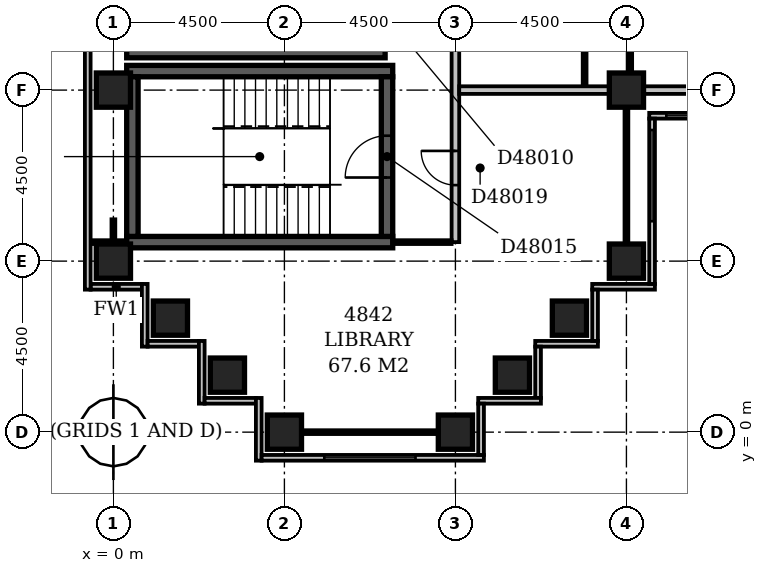
"""IFC4 building model, lengths in metres.
Left out: names, types, materials, properties, quantities, classifications, styles, units other than length and angle.
Written with IfcOpenShell. Run it as: python <this file> out.ifc"""

import sys

from ifc_helpers import new_model, si_unit, direction, frame, frame_2d, origin, origin_2d, place, context, subcontext, project, spatial, rectangle, extrude, element, fill, save


model = new_model("IFC4")
c1 = context("Model", 3, precision=1e-05, world=origin(), true_north=direction((0.0, 1.0)))
c2 = subcontext(c1, "Body", "Model", "MODEL_VIEW")
j1 = project(units=[si_unit("LENGTHUNIT", "METRE"), si_unit("PLANEANGLEUNIT", "RADIAN")], contexts=[c1])
p1 = place(None, origin())
s1 = spatial("IfcSite", under=j1, at=p1, CompositionType="ELEMENT")
p2 = place(p1, origin())
s2 = spatial("IfcBuilding", under=s1, at=p2, CompositionType="ELEMENT")
p3 = place(p2, frame((0.0, 0.0, 189.8)))
s3 = spatial("IfcBuildingStorey", under=s2, at=p3, CompositionType="ELEMENT", Elevation=189.8)
for number, where, z_axis, x_axis in (
    (1, (0.35, 5.0, -0.3), (0.0, 0.0, 1.0), (1.0, 0.0, 0.0)),
    (2, (0.35, 9.5, -0.3), (0.0, 0.0, 1.0), (1.0, 0.0, 0.0)),
):
    element("IfcWall", number, at=place(p3, frame(where, z_axis=z_axis, x_axis=x_axis)), inside=s3, PredefinedType="SHEAR", context=c2, shape_type="SweptSolid", body=[
        extrude(rectangle(XDim=7.0, YDim=0.3, at=frame_2d((3.5, 0.0))), origin(), (0.0, 0.0, 1.0), 3.6),
    ])
p4 = place(p3, frame((0.35, 10.0, -0.3), z_axis=(0.0, 0.0, 1.0), x_axis=(1.0, 0.0, 0.0)))
e3 = element("IfcWall", 3, at=p4, inside=s3, PredefinedType="SHEAR", context=c2, shape_type="SweptSolid", body=[
    extrude(rectangle(XDim=6.8, YDim=0.3, at=frame_2d((3.4, 0.0))), origin(), (0.0, 0.0, 1.0), 3.6),
])
p5 = place(p3, frame((0.5, 5.15, -0.3), z_axis=(0.0, 0.0, 1.0), x_axis=(0.0, 1.0, 0.0)))
e4 = element("IfcWall", 4, at=p5, inside=s3, PredefinedType="SHEAR", context=c2, shape_type="SweptSolid", body=[
    extrude(rectangle(XDim=4.2, YDim=0.3, at=frame_2d((2.1, 0.0))), origin(), (0.0, 0.0, 1.0), 3.6),
])
p6 = place(p3, frame((7.2, 5.15, -0.3), z_axis=(0.0, 0.0, 1.0), x_axis=(0.0, 1.0, 0.0)))
e5 = element("IfcWall", 5, at=p6, inside=s3, PredefinedType="SHEAR", context=c2, shape_type="SweptSolid", body=[
    extrude(rectangle(XDim=4.2, YDim=0.3, at=frame_2d((2.1, 0.0))), origin(), (0.0, 0.0, 1.0), 3.6),
])
p7 = place(p6, frame((1.55, 0.0, 0.3)))
e6 = element("IfcOpeningElement", 6, at=p7, cuts=e5, PredefinedType="OPENING", context=c2, shape_type="SweptSolid", body=[
    extrude(rectangle(XDim=1.1, YDim=2.1, at=frame_2d((0.55, 1.05))), frame((0.0, 0.162, 0.0), z_axis=(0.0, -1.0, 0.0), x_axis=(1.0, 0.0, 0.0)), (0.0, 0.0, 1.0), 0.324),
])
for number, where, z_axis, x_axis in (
    (7, (4.5, 0.0, -0.3), (0.0, 0.0, 1.0), (1.0, 0.0, 0.0)),
    (8, (9.0, 0.0, -0.3), (0.0, 0.0, 1.0), (1.0, 0.0, 0.0)),
    (9, (3.0, 1.5, -0.3), (0.0, 0.0, 1.0), (1.0, 0.0, 0.0)),
    (10, (10.5, 1.5, -0.3), (0.0, 0.0, 1.0), (1.0, 0.0, 0.0)),
    (11, (1.5, 3.0, -0.3), (0.0, 0.0, 1.0), (1.0, 0.0, 0.0)),
    (12, (12.0, 3.0, -0.3), (0.0, 0.0, 1.0), (1.0, 0.0, 0.0)),
    (13, (0.0, 4.5, -0.3), (0.0, 0.0, 1.0), (1.0, 0.0, 0.0)),
    (14, (13.5, 4.5, -0.3), (0.0, 0.0, 1.0), (1.0, 0.0, 0.0)),
    (15, (0.0, 9.0, -0.3), (0.0, 0.0, 1.0), (1.0, 0.0, 0.0)),
    (16, (13.5, 9.0, -0.3), (0.0, 0.0, 1.0), (1.0, 0.0, 0.0)),
):
    element("IfcColumn", number, at=place(p3, frame(where, z_axis=z_axis, x_axis=x_axis)), inside=s3, PredefinedType="COLUMN", context=c2, shape_type="SweptSolid", body=[
        extrude(rectangle(XDim=0.9, YDim=0.9, at=origin_2d()), origin(), (0.0, 0.0, 1.0), 3.6),
    ])
p8 = place(p3, frame((-0.6, 3.825, 0.0), z_axis=(0.0, 0.0, 1.0), x_axis=(1.0, 0.0, 0.0)))
e17 = element("IfcWall", 17, at=p8, inside=s3, PredefinedType="STANDARD", context=c2, shape_type="SweptSolid", body=[
    extrude(rectangle(XDim=1.35, YDim=0.15, at=frame_2d((0.675, 0.0))), origin(), (0.0, 0.0, 1.0), 2.7),
])
p9 = place(p3, frame((0.825, 3.9, 0.0), z_axis=(0.0, 0.0, 1.0), x_axis=(0.0, -1.0, 0.0)))
e18 = element("IfcWall", 18, at=p9, inside=s3, PredefinedType="STANDARD", context=c2, shape_type="SweptSolid", body=[
    extrude(rectangle(XDim=1.65, YDim=0.15, at=frame_2d((0.825, 0.0))), origin(), (0.0, 0.0, 1.0), 2.7),
])
p10 = place(p3, frame((0.9, 2.325, 0.0), z_axis=(0.0, 0.0, 1.0), x_axis=(1.0, 0.0, 0.0)))
e19 = element("IfcWall", 19, at=p10, inside=s3, PredefinedType="STANDARD", context=c2, shape_type="SweptSolid", body=[
    extrude(rectangle(XDim=1.35, YDim=0.15, at=frame_2d((0.675, 0.0))), origin(), (0.0, 0.0, 1.0), 2.7),
])
p11 = place(p3, frame((2.325, 2.4, 0.0), z_axis=(0.0, 0.0, 1.0), x_axis=(0.0, -1.0, 0.0)))
e20 = element("IfcWall", 20, at=p11, inside=s3, PredefinedType="STANDARD", context=c2, shape_type="SweptSolid", body=[
    extrude(rectangle(XDim=1.65, YDim=0.15, at=frame_2d((0.825, 0.0))), origin(), (0.0, 0.0, 1.0), 2.7),
])
p12 = place(p3, frame((2.4, 0.825, 0.0), z_axis=(0.0, 0.0, 1.0), x_axis=(1.0, 0.0, 0.0)))
e21 = element("IfcWall", 21, at=p12, inside=s3, PredefinedType="STANDARD", context=c2, shape_type="SweptSolid", body=[
    extrude(rectangle(XDim=1.35, YDim=0.15, at=frame_2d((0.675, 0.0))), origin(), (0.0, 0.0, 1.0), 2.7),
])
p13 = place(p3, frame((3.825, 0.9, 0.0), z_axis=(0.0, 0.0, 1.0), x_axis=(0.0, -1.0, 0.0)))
e22 = element("IfcWall", 22, at=p13, inside=s3, PredefinedType="STANDARD", context=c2, shape_type="SweptSolid", body=[
    extrude(rectangle(XDim=1.65, YDim=0.15, at=frame_2d((0.825, 0.0))), origin(), (0.0, 0.0, 1.0), 2.7),
])
p14 = place(p3, frame((3.9, -0.675, 0.0), z_axis=(0.0, 0.0, 1.0), x_axis=(1.0, 0.0, 0.0)))
e23 = element("IfcWall", 23, at=p14, inside=s3, PredefinedType="STANDARD", context=c2, shape_type="SweptSolid", body=[
    extrude(rectangle(XDim=5.85, YDim=0.15, at=frame_2d((2.925, 0.0))), origin(), (0.0, 0.0, 1.0), 2.7),
])
p15 = place(p14, frame((1.65, 0.0, 0.6)))
e24 = element("IfcOpeningElement", 24, at=p15, cuts=e23, PredefinedType="OPENING", context=c2, shape_type="SweptSolid", body=[
    extrude(rectangle(XDim=2.4, YDim=1.8, at=frame_2d((1.2, 0.9))), frame((0.0, 0.087, 0.0), z_axis=(0.0, -1.0, 0.0), x_axis=(1.0, 0.0, 0.0)), (0.0, 0.0, 1.0), 0.174),
])
p16 = place(p3, frame((9.675, -0.6, 0.0), z_axis=(0.0, 0.0, 1.0), x_axis=(0.0, 1.0, 0.0)))
e25 = element("IfcWall", 25, at=p16, inside=s3, PredefinedType="STANDARD", context=c2, shape_type="SweptSolid", body=[
    extrude(rectangle(XDim=1.35, YDim=0.15, at=frame_2d((0.675, 0.0))), origin(), (0.0, 0.0, 1.0), 2.7),
])
p17 = place(p3, frame((9.6, 0.825, 0.0), z_axis=(0.0, 0.0, 1.0), x_axis=(1.0, 0.0, 0.0)))
e26 = element("IfcWall", 26, at=p17, inside=s3, PredefinedType="STANDARD", context=c2, shape_type="SweptSolid", body=[
    extrude(rectangle(XDim=1.65, YDim=0.15, at=frame_2d((0.825, 0.0))), origin(), (0.0, 0.0, 1.0), 2.7),
])
p18 = place(p3, frame((11.175, 0.9, 0.0), z_axis=(0.0, 0.0, 1.0), x_axis=(0.0, 1.0, 0.0)))
e27 = element("IfcWall", 27, at=p18, inside=s3, PredefinedType="STANDARD", context=c2, shape_type="SweptSolid", body=[
    extrude(rectangle(XDim=1.35, YDim=0.15, at=frame_2d((0.675, 0.0))), origin(), (0.0, 0.0, 1.0), 2.7),
])
p19 = place(p3, frame((11.1, 2.325, 0.0), z_axis=(0.0, 0.0, 1.0), x_axis=(1.0, 0.0, 0.0)))
e28 = element("IfcWall", 28, at=p19, inside=s3, PredefinedType="STANDARD", context=c2, shape_type="SweptSolid", body=[
    extrude(rectangle(XDim=1.65, YDim=0.15, at=frame_2d((0.825, 0.0))), origin(), (0.0, 0.0, 1.0), 2.7),
])
p20 = place(p3, frame((12.675, 2.4, 0.0), z_axis=(0.0, 0.0, 1.0), x_axis=(0.0, 1.0, 0.0)))
e29 = element("IfcWall", 29, at=p20, inside=s3, PredefinedType="STANDARD", context=c2, shape_type="SweptSolid", body=[
    extrude(rectangle(XDim=1.35, YDim=0.15, at=frame_2d((0.675, 0.0))), origin(), (0.0, 0.0, 1.0), 2.7),
])
p21 = place(p3, frame((12.6, 3.825, 0.0), z_axis=(0.0, 0.0, 1.0), x_axis=(1.0, 0.0, 0.0)))
e30 = element("IfcWall", 30, at=p21, inside=s3, PredefinedType="STANDARD", context=c2, shape_type="SweptSolid", body=[
    extrude(rectangle(XDim=1.65, YDim=0.15, at=frame_2d((0.825, 0.0))), origin(), (0.0, 0.0, 1.0), 2.7),
])
p22 = place(p3, frame((14.175, 3.9, 0.0), z_axis=(0.0, 0.0, 1.0), x_axis=(0.0, 1.0, 0.0)))
e31 = element("IfcWall", 31, at=p22, inside=s3, PredefinedType="STANDARD", context=c2, shape_type="SweptSolid", body=[
    extrude(rectangle(XDim=4.35, YDim=0.15, at=frame_2d((2.175, 0.0))), origin(), (0.0, 0.0, 1.0), 2.7),
])
p23 = place(p22, frame((1.65, 0.0, 0.6)))
e32 = element("IfcOpeningElement", 32, at=p23, cuts=e31, PredefinedType="OPENING", context=c2, shape_type="SweptSolid", body=[
    extrude(rectangle(XDim=2.4, YDim=1.8, at=frame_2d((1.2, 0.9))), frame((0.0, 0.087, 0.0), z_axis=(0.0, -1.0, 0.0), x_axis=(1.0, 0.0, 0.0)), (0.0, 0.0, 1.0), 0.174),
])
p24 = place(p3, frame((14.1, 8.325, 0.0), z_axis=(0.0, 0.0, 1.0), x_axis=(1.0, 0.0, 0.0)))
e33 = element("IfcWall", 33, at=p24, inside=s3, PredefinedType="STANDARD", context=c2, shape_type="SweptSolid", body=[
    extrude(rectangle(XDim=4.65, YDim=0.15, at=frame_2d((2.325, 0.0))), origin(), (0.0, 0.0, 1.0), 2.7),
])
p25 = place(p24, frame((0.45, 0.0, 0.6)))
e34 = element("IfcOpeningElement", 34, at=p25, cuts=e33, PredefinedType="OPENING", context=c2, shape_type="SweptSolid", body=[
    extrude(rectangle(XDim=2.4, YDim=1.8, at=frame_2d((1.2, 0.9))), frame((0.0, 0.087, 0.0), z_axis=(0.0, -1.0, 0.0), x_axis=(1.0, 0.0, 0.0)), (0.0, 0.0, 1.0), 0.174),
])
p26 = place(p3, frame((-0.675, 59.1, 0.0), z_axis=(0.0, 0.0, 1.0), x_axis=(0.0, -1.0, 0.0)))
e35 = element("IfcWall", 35, at=p26, inside=s3, PredefinedType="STANDARD", context=c2, shape_type="SweptSolid", body=[
    extrude(rectangle(XDim=55.35, YDim=0.15, at=frame_2d((27.675, 0.0))), origin(), (0.0, 0.0, 1.0), 2.7),
])
p27 = place(p3, frame((4.95, 0.0, 0.0), z_axis=(0.0, 0.0, 1.0), x_axis=(1.0, 0.0, 0.0)))
e36 = element("IfcWall", 36, at=p27, inside=s3, PredefinedType="PARTITIONING", context=c2, shape_type="SweptSolid", body=[
    extrude(rectangle(XDim=3.6, YDim=0.1, at=frame_2d((1.8, 0.0))), origin(), (0.0, 0.0, 1.0), 2.7),
])
p28 = place(p3, frame((0.0, 4.95, 0.0), z_axis=(0.0, 0.0, 1.0), x_axis=(0.0, 1.0, 0.0)))
e37 = element("IfcWall", 37, at=p28, inside=s3, PredefinedType="PARTITIONING", context=c2, shape_type="SweptSolid", body=[
    extrude(rectangle(XDim=0.65, YDim=0.1, at=frame_2d((0.325, 0.0))), origin(), (0.0, 0.0, 1.0), 2.7),
])
p29 = place(p3, frame((13.5, 4.95, 0.0), z_axis=(0.0, 0.0, 1.0), x_axis=(0.0, 1.0, 0.0)))
e38 = element("IfcWall", 38, at=p29, inside=s3, PredefinedType="PARTITIONING", context=c2, shape_type="SweptSolid", body=[
    extrude(rectangle(XDim=3.6, YDim=0.1, at=frame_2d((1.8, 0.0))), origin(), (0.0, 0.0, 1.0), 2.7),
])
p30 = place(p3, frame((-0.6, 5.0, 0.0), z_axis=(0.0, 0.0, 1.0), x_axis=(1.0, 0.0, 0.0)))
e39 = element("IfcWall", 39, at=p30, inside=s3, PredefinedType="PARTITIONING", context=c2, shape_type="SweptSolid", body=[
    extrude(rectangle(XDim=0.951, YDim=0.1, at=frame_2d((0.476, 0.0))), origin(), (0.0, 0.0, 1.0), 3.3),
])
p31 = place(p3, frame((7.349, 5.0, 0.0), z_axis=(0.0, 0.0, 1.0), x_axis=(1.0, 0.0, 0.0)))
e40 = element("IfcWall", 40, at=p31, inside=s3, PredefinedType="PARTITIONING", context=c2, shape_type="SweptSolid", body=[
    extrude(rectangle(XDim=1.551, YDim=0.1, at=frame_2d((0.775, 0.0))), origin(), (0.0, 0.0, 1.0), 3.3),
])
p32 = place(p3, frame((9.0, 5.0, 0.0), z_axis=(0.0, 0.0, 1.0), x_axis=(0.0, 1.0, 0.0)))
e41 = element("IfcWall", 41, at=p32, inside=s3, PredefinedType="PARTITIONING", context=c2, shape_type="SweptSolid", body=[
    extrude(rectangle(XDim=31.0, YDim=0.2, at=frame_2d((15.5, 0.0))), origin(), (0.0, 0.0, 1.0), 3.3),
])
p33 = place(p32, frame((17.8, 0.0, 0.0)))
e42 = element("IfcOpeningElement", 42, at=p33, cuts=e41, PredefinedType="OPENING", context=c2, shape_type="SweptSolid", body=[
    extrude(rectangle(XDim=1.0, YDim=2.1, at=frame_2d((0.5, 1.05))), frame((0.0, 0.112, 0.0), z_axis=(0.0, -1.0, 0.0), x_axis=(1.0, 0.0, 0.0)), (0.0, 0.0, 1.0), 0.224),
])
p34 = place(p32, frame((14.95, 0.0, 0.0)))
e43 = element("IfcOpeningElement", 43, at=p34, cuts=e41, PredefinedType="OPENING", context=c2, shape_type="SweptSolid", body=[
    extrude(rectangle(XDim=1.0, YDim=2.1, at=frame_2d((0.5, 1.05))), frame((0.0, 0.112, 0.0), z_axis=(0.0, -1.0, 0.0), x_axis=(1.0, 0.0, 0.0)), (0.0, 0.0, 1.0), 0.224),
])
p35 = place(p32, frame((9.3, 0.0, 0.0)))
e44 = element("IfcOpeningElement", 44, at=p35, cuts=e41, PredefinedType="OPENING", context=c2, shape_type="SweptSolid", body=[
    extrude(rectangle(XDim=1.0, YDim=2.1, at=frame_2d((0.5, 1.05))), frame((0.0, 0.112, 0.0), z_axis=(0.0, -1.0, 0.0), x_axis=(1.0, 0.0, 0.0)), (0.0, 0.0, 1.0), 0.224),
])
p36 = place(p32, frame((1.5, 0.0, 0.0)))
e45 = element("IfcOpeningElement", 45, at=p36, cuts=e41, PredefinedType="OPENING", context=c2, shape_type="SweptSolid", body=[
    extrude(rectangle(XDim=0.9, YDim=2.1, at=frame_2d((0.45, 1.05))), frame((0.0, 0.112, 0.0), z_axis=(0.0, -1.0, 0.0), x_axis=(1.0, 0.0, 0.0)), (0.0, 0.0, 1.0), 0.224),
])
p37 = place(p3, frame((9.1, 9.0, 0.0), z_axis=(0.0, 0.0, 1.0), x_axis=(1.0, 0.0, 0.0)))
e46 = element("IfcWall", 46, at=p37, inside=s3, PredefinedType="PARTITIONING", context=c2, shape_type="SweptSolid", body=[
    extrude(rectangle(XDim=3.95, YDim=0.2, at=frame_2d((1.975, 0.0))), origin(), (0.0, 0.0, 1.0), 3.3),
])
p38 = place(p3, frame((13.95, 9.0, 0.0), z_axis=(0.0, 0.0, 1.0), x_axis=(1.0, 0.0, 0.0)))
e47 = element("IfcWall", 47, at=p38, inside=s3, PredefinedType="PARTITIONING", context=c2, shape_type="SweptSolid", body=[
    extrude(rectangle(XDim=3.6, YDim=0.2, at=frame_2d((1.8, 0.0))), origin(), (0.0, 0.0, 1.0), 2.7),
])
p39 = place(p3, frame((12.4, 9.1, 0.0), z_axis=(0.0, 0.0, 1.0), x_axis=(0.0, 1.0, 0.0)))
e48 = element("IfcWall", 48, at=p39, inside=s3, PredefinedType="PARTITIONING", context=c2, shape_type="SweptSolid", body=[
    extrude(rectangle(XDim=4.9, YDim=0.1, at=frame_2d((2.45, 0.0))), origin(), (0.0, 0.0, 1.0), 3.3),
])
p40 = place(p39, frame((1.95, 0.0, 0.0)))
e49 = element("IfcOpeningElement", 49, at=p40, cuts=e48, PredefinedType="OPENING", context=c2, shape_type="SweptSolid", body=[
    extrude(rectangle(XDim=0.9, YDim=2.1, at=frame_2d((0.45, 1.05))), frame((0.0, 0.062, 0.0), z_axis=(0.0, -1.0, 0.0), x_axis=(1.0, 0.0, 0.0)), (0.0, 0.0, 1.0), 0.124),
])
p41 = place(p3, frame((13.6, 9.45, 0.0), z_axis=(0.0, 0.0, 1.0), x_axis=(0.0, 1.0, 0.0)))
e50 = element("IfcWall", 50, at=p41, inside=s3, PredefinedType="PARTITIONING", context=c2, shape_type="SweptSolid", body=[
    extrude(rectangle(XDim=8.45, YDim=0.1, at=frame_2d((4.225, 0.0))), origin(), (0.0, 0.0, 1.0), 3.3),
])
p42 = place(p41, frame((1.35, 0.0, 0.0)))
e51 = element("IfcOpeningElement", 51, at=p42, cuts=e50, PredefinedType="OPENING", context=c2, shape_type="SweptSolid", body=[
    extrude(rectangle(XDim=0.9, YDim=2.1, at=frame_2d((0.45, 1.05))), frame((0.0, 0.062, 0.0), z_axis=(0.0, -1.0, 0.0), x_axis=(1.0, 0.0, 0.0)), (0.0, 0.0, 1.0), 0.124),
])
p43 = place(p41, frame((5.85, 0.0, 0.0)))
e52 = element("IfcOpeningElement", 52, at=p43, cuts=e50, PredefinedType="OPENING", context=c2, shape_type="SweptSolid", body=[
    extrude(rectangle(XDim=0.9, YDim=2.1, at=frame_2d((0.45, 1.05))), frame((0.0, 0.062, 0.0), z_axis=(0.0, -1.0, 0.0), x_axis=(1.0, 0.0, 0.0)), (0.0, 0.0, 1.0), 0.124),
])
p44 = place(p15, origin())
e53 = element("IfcWindow", 53, at=p44, inside=s3, PartitioningType="SINGLE_PANEL", PredefinedType="WINDOW", context=c2, shape_type="SweptSolid", body=[
    extrude(rectangle(XDim=2.4, YDim=1.8, at=frame_2d((1.2, 0.9))), frame((0.0, 0.03, 0.0), z_axis=(0.0, -1.0, 0.0), x_axis=(1.0, 0.0, 0.0)), (0.0, 0.0, 1.0), 0.06),
])
fill(e24, e53)
p45 = place(p23, origin())
e54 = element("IfcWindow", 54, at=p45, inside=s3, PartitioningType="SINGLE_PANEL", PredefinedType="WINDOW", context=c2, shape_type="SweptSolid", body=[
    extrude(rectangle(XDim=2.4, YDim=1.8, at=frame_2d((1.2, 0.9))), frame((0.0, 0.03, 0.0), z_axis=(0.0, -1.0, 0.0), x_axis=(1.0, 0.0, 0.0)), (0.0, 0.0, 1.0), 0.06),
])
fill(e32, e54)
p46 = place(p25, origin())
e55 = element("IfcWindow", 55, at=p46, inside=s3, PartitioningType="SINGLE_PANEL", PredefinedType="WINDOW", context=c2, shape_type="SweptSolid", body=[
    extrude(rectangle(XDim=2.4, YDim=1.8, at=frame_2d((1.2, 0.9))), frame((0.0, 0.03, 0.0), z_axis=(0.0, -1.0, 0.0), x_axis=(1.0, 0.0, 0.0)), (0.0, 0.0, 1.0), 0.06),
])
fill(e34, e55)
p47 = place(p7, origin())
e56 = element("IfcDoor", 56, at=p47, inside=s3, OperationType="SINGLE_SWING_LEFT", PredefinedType="DOOR", context=c2, shape_type="SweptSolid", body=[
    extrude(rectangle(XDim=1.1, YDim=2.1, at=frame_2d((0.55, 1.05))), frame((0.0, 0.025, 0.0), z_axis=(0.0, -1.0, 0.0), x_axis=(1.0, 0.0, 0.0)), (0.0, 0.0, 1.0), 0.05),
])
fill(e6, e56)
p48 = place(p36, frame((0.9, 0.0, 0.0), z_axis=(0.0, 0.0, 1.0), x_axis=(-1.0, 0.0, 0.0)))
e57 = element("IfcDoor", 57, at=p48, inside=s3, OperationType="SINGLE_SWING_LEFT", PredefinedType="DOOR", context=c2, shape_type="SweptSolid", body=[
    extrude(rectangle(XDim=0.9, YDim=2.1, at=frame_2d((0.45, 1.05))), frame((0.0, 0.025, 0.0), z_axis=(0.0, -1.0, 0.0), x_axis=(1.0, 0.0, 0.0)), (0.0, 0.0, 1.0), 0.05),
])
fill(e45, e57)
save(model, sys.argv[1])
